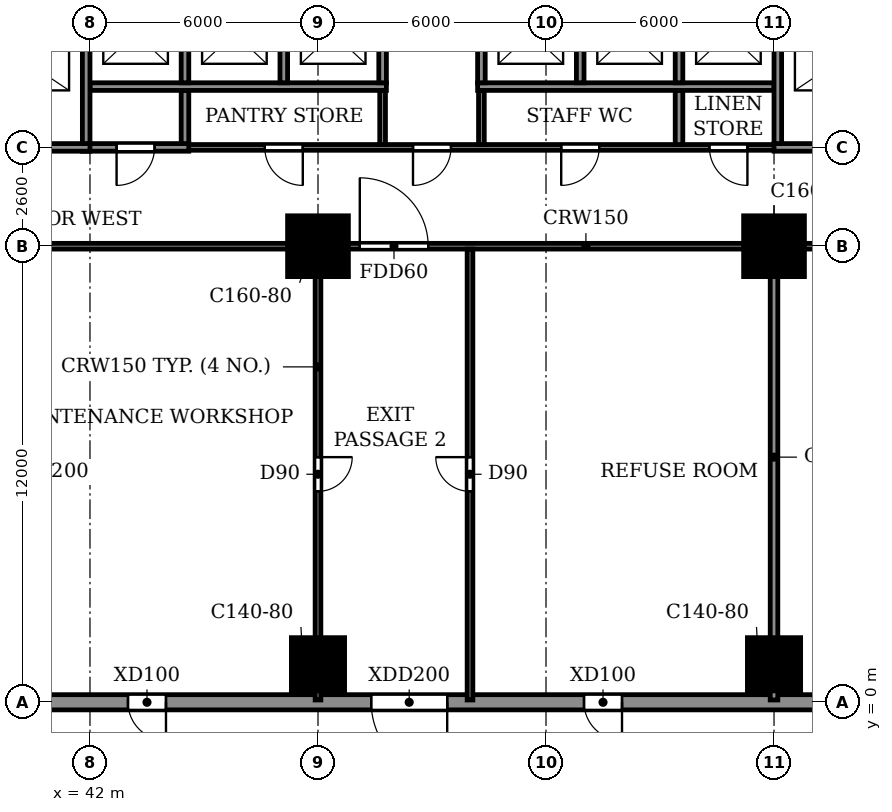
"""IFC4 building model, lengths in metres.
Left out: names, types, materials, properties, quantities, classifications, styles, units other than length and angle.
Written with IfcOpenShell. Run it as: python <this file> out.ifc"""

import sys

from ifc_helpers import new_model, si_unit, direction, frame, frame_2d, origin, origin_2d, place, context, subcontext, project, spatial, rectangle, extrude, source, transform, mapped, element, fill, save


model = new_model("IFC4")
c1 = context("Model", 3, precision=1e-05, world=origin(), true_north=direction((0.0, 1.0)))
c2 = subcontext(c1, "Body", "Model", "MODEL_VIEW")
j1 = project(units=[si_unit("LENGTHUNIT", "METRE"), si_unit("PLANEANGLEUNIT", "RADIAN")], contexts=[c1])
p1 = place(None, origin())
s1 = spatial("IfcSite", under=j1, at=p1, CompositionType="ELEMENT")
p2 = place(p1, origin())
s2 = spatial("IfcBuilding", under=s1, at=p2, CompositionType="ELEMENT")
p3 = place(p2, origin())
s3 = spatial("IfcBuildingStorey", under=s2, at=p3, CompositionType="ELEMENT", Elevation=0.0)
m1 = source(origin(), c2, "Body", "SweptSolid", [
    extrude(rectangle(XDim=1.4, YDim=1.4, at=origin_2d()), origin(), (0.0, 0.0, 1.0), 4.5),
])
p4 = place(p3, frame((48.0, 1.0, -0.3), z_axis=(0.0, 0.0, 1.0), x_axis=(1.0, 0.0, 0.0)))
e1 = element("IfcColumn", 1, at=p4, inside=s3, PredefinedType="COLUMN", context=c2, shape_type="MappedRepresentation", body=[
    mapped(m1, transform((0.0, 0.0, 0.0))),
])
m2 = source(origin(), c2, "Body", "SweptSolid", [
    extrude(rectangle(XDim=1.6, YDim=1.6, at=origin_2d()), origin(), (0.0, 0.0, 1.0), 4.5),
])
p5 = place(p3, frame((48.0, 12.0, -0.3), z_axis=(0.0, 0.0, 1.0), x_axis=(1.0, 0.0, 0.0)))
e2 = element("IfcColumn", 2, at=p5, inside=s3, PredefinedType="COLUMN", context=c2, shape_type="MappedRepresentation", body=[
    mapped(m2, transform((0.0, 0.0, 0.0))),
])
p6 = place(p3, frame((60.0, 1.0, -0.3), z_axis=(0.0, 0.0, 1.0), x_axis=(1.0, 0.0, 0.0)))
e3 = element("IfcColumn", 3, at=p6, inside=s3, PredefinedType="COLUMN", context=c2, shape_type="MappedRepresentation", body=[
    mapped(m1, transform((0.0, 0.0, 0.0))),
])
p7 = place(p3, frame((60.0, 12.0, -0.3), z_axis=(0.0, 0.0, 1.0), x_axis=(1.0, 0.0, 0.0)))
e4 = element("IfcColumn", 4, at=p7, inside=s3, PredefinedType="COLUMN", context=c2, shape_type="MappedRepresentation", body=[
    mapped(m2, transform((0.0, 0.0, 0.0))),
])
p8 = place(p3, frame((-0.2, 0.0, 0.0), z_axis=(0.0, 0.0, 1.0), x_axis=(1.0, 0.0, 0.0)))
e5 = element("IfcWall", 5, at=p8, inside=s3, PredefinedType="STANDARD", context=c2, shape_type="SweptSolid", body=[
    extrude(rectangle(XDim=102.4, YDim=0.4, at=frame_2d((51.2, 0.0))), origin(), (0.0, 0.0, 1.0), 4.2),
])
p9 = place(p8, frame((13.6, 0.0, 0.0)))
e6 = element("IfcOpeningElement", 6, at=p9, cuts=e5, PredefinedType="OPENING", context=c2, shape_type="SweptSolid", body=[
    extrude(rectangle(XDim=2.0, YDim=2.4, at=frame_2d((1.0, 1.2))), frame((0.0, 0.21, 0.0), z_axis=(0.0, -1.0, 0.0), x_axis=(1.0, 0.0, 0.0)), (0.0, 0.0, 1.0), 0.42),
])
p10 = place(p8, frame((43.2, 0.0, 0.0)))
e7 = element("IfcOpeningElement", 7, at=p10, cuts=e5, PredefinedType="OPENING", context=c2, shape_type="SweptSolid", body=[
    extrude(rectangle(XDim=1.0, YDim=2.1, at=frame_2d((0.5, 1.05))), frame((0.0, 0.21, 0.0), z_axis=(0.0, -1.0, 0.0), x_axis=(1.0, 0.0, 0.0)), (0.0, 0.0, 1.0), 0.42),
])
p11 = place(p8, frame((49.6, 0.0, 0.0)))
e8 = element("IfcOpeningElement", 8, at=p11, cuts=e5, PredefinedType="OPENING", context=c2, shape_type="SweptSolid", body=[
    extrude(rectangle(XDim=2.0, YDim=2.4, at=frame_2d((1.0, 1.2))), frame((0.0, 0.21, 0.0), z_axis=(0.0, -1.0, 0.0), x_axis=(1.0, 0.0, 0.0)), (0.0, 0.0, 1.0), 0.42),
])
p12 = place(p8, frame((55.2, 0.0, 0.0)))
e9 = element("IfcOpeningElement", 9, at=p12, cuts=e5, PredefinedType="OPENING", context=c2, shape_type="SweptSolid", body=[
    extrude(rectangle(XDim=1.0, YDim=2.1, at=frame_2d((0.5, 1.05))), frame((0.0, 0.21, 0.0), z_axis=(0.0, -1.0, 0.0), x_axis=(1.0, 0.0, 0.0)), (0.0, 0.0, 1.0), 0.42),
])
p13 = place(p8, frame((65.2, 0.0, 0.0)))
e10 = element("IfcOpeningElement", 10, at=p13, cuts=e5, PredefinedType="OPENING", context=c2, shape_type="SweptSolid", body=[
    extrude(rectangle(XDim=2.0, YDim=2.4, at=frame_2d((1.0, 1.2))), frame((0.0, 0.21, 0.0), z_axis=(0.0, -1.0, 0.0), x_axis=(1.0, 0.0, 0.0)), (0.0, 0.0, 1.0), 0.42),
])
p14 = place(p8, frame((77.2, 0.0, 0.0)))
e11 = element("IfcOpeningElement", 11, at=p14, cuts=e5, PredefinedType="OPENING", context=c2, shape_type="SweptSolid", body=[
    extrude(rectangle(XDim=2.0, YDim=2.4, at=frame_2d((1.0, 1.2))), frame((0.0, 0.21, 0.0), z_axis=(0.0, -1.0, 0.0), x_axis=(1.0, 0.0, 0.0)), (0.0, 0.0, 1.0), 0.42),
])
p15 = place(p8, frame((86.2, 0.0, 0.0)))
e12 = element("IfcOpeningElement", 12, at=p15, cuts=e5, PredefinedType="OPENING", context=c2, shape_type="SweptSolid", body=[
    extrude(rectangle(XDim=2.0, YDim=2.4, at=frame_2d((1.0, 1.2))), frame((0.0, 0.21, 0.0), z_axis=(0.0, -1.0, 0.0), x_axis=(1.0, 0.0, 0.0)), (0.0, 0.0, 1.0), 0.42),
])
p16 = place(p8, frame((90.7, 0.0, 0.0)))
e13 = element("IfcOpeningElement", 13, at=p16, cuts=e5, PredefinedType="OPENING", context=c2, shape_type="SweptSolid", body=[
    extrude(rectangle(XDim=2.0, YDim=2.4, at=frame_2d((1.0, 1.2))), frame((0.0, 0.21, 0.0), z_axis=(0.0, -1.0, 0.0), x_axis=(1.0, 0.0, 0.0)), (0.0, 0.0, 1.0), 0.42),
])
p17 = place(p8, frame((98.2, 0.0, 0.0)))
e14 = element("IfcOpeningElement", 14, at=p17, cuts=e5, PredefinedType="OPENING", context=c2, shape_type="SweptSolid", body=[
    extrude(rectangle(XDim=2.0, YDim=2.4, at=frame_2d((1.0, 1.2))), frame((0.0, 0.21, 0.0), z_axis=(0.0, -1.0, 0.0), x_axis=(1.0, 0.0, 0.0)), (0.0, 0.0, 1.0), 0.42),
])
p18 = place(p3, frame((38.9, 12.0, 0.0), z_axis=(0.0, 0.0, 1.0), x_axis=(1.0, 0.0, 0.0)))
e15 = element("IfcWall", 15, at=p18, inside=s3, PredefinedType="PARTITIONING", context=c2, shape_type="SweptSolid", body=[
    extrude(rectangle(XDim=63.1, YDim=0.15, at=frame_2d((31.55, 0.0))), origin(), (0.0, 0.0, 1.0), 4.2),
])
p19 = place(p18, frame((10.2, 0.0, 0.0)))
e16 = element("IfcOpeningElement", 16, at=p19, cuts=e15, PredefinedType="OPENING", context=c2, shape_type="SweptSolid", body=[
    extrude(rectangle(XDim=1.8, YDim=2.1, at=frame_2d((0.9, 1.05))), frame((0.0, 0.085, 0.0), z_axis=(0.0, -1.0, 0.0), x_axis=(1.0, 0.0, 0.0)), (0.0, 0.0, 1.0), 0.17),
])
p20 = place(p18, frame((23.65, 0.0, 0.0)))
e17 = element("IfcOpeningElement", 17, at=p20, cuts=e15, PredefinedType="OPENING", context=c2, shape_type="SweptSolid", body=[
    extrude(rectangle(XDim=0.9, YDim=2.1, at=frame_2d((0.45, 1.05))), frame((0.0, 0.085, 0.0), z_axis=(0.0, -1.0, 0.0), x_axis=(1.0, 0.0, 0.0)), (0.0, 0.0, 1.0), 0.17),
])
p21 = place(p18, frame((38.65, 0.0, 0.0)))
e18 = element("IfcOpeningElement", 18, at=p21, cuts=e15, PredefinedType="OPENING", context=c2, shape_type="SweptSolid", body=[
    extrude(rectangle(XDim=0.9, YDim=2.1, at=frame_2d((0.45, 1.05))), frame((0.0, 0.085, 0.0), z_axis=(0.0, -1.0, 0.0), x_axis=(1.0, 0.0, 0.0)), (0.0, 0.0, 1.0), 0.17),
])
p22 = place(p18, frame((51.7, 0.0, 0.0)))
e19 = element("IfcOpeningElement", 19, at=p22, cuts=e15, PredefinedType="OPENING", context=c2, shape_type="SweptSolid", body=[
    extrude(rectangle(XDim=1.8, YDim=2.1, at=frame_2d((0.9, 1.05))), frame((0.0, 0.085, 0.0), z_axis=(0.0, -1.0, 0.0), x_axis=(1.0, 0.0, 0.0)), (0.0, 0.0, 1.0), 0.17),
])
p23 = place(p3, frame((44.4, 14.6, 0.0), z_axis=(0.0, 0.0, 1.0), x_axis=(1.0, 0.0, 0.0)))
e20 = element("IfcWall", 20, at=p23, inside=s3, PredefinedType="PARTITIONING", context=c2, shape_type="SweptSolid", body=[
    extrude(rectangle(XDim=15.8, YDim=0.15, at=frame_2d((7.9, 0.0))), origin(), (0.0, 0.0, 1.0), 4.2),
])
p24 = place(p23, frame((2.2, 0.0, 0.0)))
e21 = element("IfcOpeningElement", 21, at=p24, cuts=e20, PredefinedType="OPENING", context=c2, shape_type="SweptSolid", body=[
    extrude(rectangle(XDim=1.0, YDim=2.1, at=frame_2d((0.5, 1.05))), frame((0.0, 0.085, 0.0), z_axis=(0.0, -1.0, 0.0), x_axis=(1.0, 0.0, 0.0)), (0.0, 0.0, 1.0), 0.17),
])
p25 = place(p23, frame((6.1, 0.0, 0.0)))
e22 = element("IfcOpeningElement", 22, at=p25, cuts=e20, PredefinedType="OPENING", context=c2, shape_type="SweptSolid", body=[
    extrude(rectangle(XDim=1.0, YDim=2.1, at=frame_2d((0.5, 1.05))), frame((0.0, 0.085, 0.0), z_axis=(0.0, -1.0, 0.0), x_axis=(1.0, 0.0, 0.0)), (0.0, 0.0, 1.0), 0.17),
])
p26 = place(p23, frame((10.0, 0.0, 0.0)))
e23 = element("IfcOpeningElement", 23, at=p26, cuts=e20, PredefinedType="OPENING", context=c2, shape_type="SweptSolid", body=[
    extrude(rectangle(XDim=1.0, YDim=2.1, at=frame_2d((0.5, 1.05))), frame((0.0, 0.085, 0.0), z_axis=(0.0, -1.0, 0.0), x_axis=(1.0, 0.0, 0.0)), (0.0, 0.0, 1.0), 0.17),
])
p27 = place(p23, frame((13.9, 0.0, 0.0)))
e24 = element("IfcOpeningElement", 24, at=p27, cuts=e20, PredefinedType="OPENING", context=c2, shape_type="SweptSolid", body=[
    extrude(rectangle(XDim=1.0, YDim=2.1, at=frame_2d((0.5, 1.05))), frame((0.0, 0.085, 0.0), z_axis=(0.0, -1.0, 0.0), x_axis=(1.0, 0.0, 0.0)), (0.0, 0.0, 1.0), 0.17),
])
p28 = place(p3, frame((48.0, 0.06, 0.0), z_axis=(0.0, 0.0, 1.0), x_axis=(0.0, 1.0, 0.0)))
e25 = element("IfcWall", 25, at=p28, inside=s3, PredefinedType="PARTITIONING", context=c2, shape_type="SweptSolid", body=[
    extrude(rectangle(XDim=11.865, YDim=0.15, at=frame_2d((5.933, 0.0))), origin(), (0.0, 0.0, 1.0), 4.2),
])
p29 = place(p28, frame((5.49, 0.0, 0.0)))
e26 = element("IfcOpeningElement", 26, at=p29, cuts=e25, PredefinedType="OPENING", context=c2, shape_type="SweptSolid", body=[
    extrude(rectangle(XDim=0.9, YDim=2.1, at=frame_2d((0.45, 1.05))), frame((0.0, 0.085, 0.0), z_axis=(0.0, -1.0, 0.0), x_axis=(1.0, 0.0, 0.0)), (0.0, 0.0, 1.0), 0.17),
])
p30 = place(p3, frame((49.7, 14.675, 0.0), z_axis=(0.0, 0.0, 1.0), x_axis=(0.0, 1.0, 0.0)))
e27 = element("IfcWall", 27, at=p30, inside=s3, PredefinedType="PARTITIONING", context=c2, shape_type="SweptSolid", body=[
    extrude(rectangle(XDim=1.425, YDim=0.15, at=frame_2d((0.712, 0.0))), origin(), (0.0, 0.0, 1.0), 4.2),
])
p31 = place(p3, frame((52.0, 0.06, 0.0), z_axis=(0.0, 0.0, 1.0), x_axis=(0.0, 1.0, 0.0)))
e28 = element("IfcWall", 28, at=p31, inside=s3, PredefinedType="PARTITIONING", context=c2, shape_type="SweptSolid", body=[
    extrude(rectangle(XDim=11.865, YDim=0.15, at=frame_2d((5.933, 0.0))), origin(), (0.0, 0.0, 1.0), 4.2),
])
p32 = place(p31, frame((5.49, 0.0, 0.0)))
e29 = element("IfcOpeningElement", 29, at=p32, cuts=e28, PredefinedType="OPENING", context=c2, shape_type="SweptSolid", body=[
    extrude(rectangle(XDim=0.9, YDim=2.1, at=frame_2d((0.45, 1.05))), frame((0.0, 0.085, 0.0), z_axis=(0.0, -1.0, 0.0), x_axis=(1.0, 0.0, 0.0)), (0.0, 0.0, 1.0), 0.17),
])
p33 = place(p3, frame((52.3, 14.675, 0.0), z_axis=(0.0, 0.0, 1.0), x_axis=(0.0, 1.0, 0.0)))
e30 = element("IfcWall", 30, at=p33, inside=s3, PredefinedType="PARTITIONING", context=c2, shape_type="SweptSolid", body=[
    extrude(rectangle(XDim=1.425, YDim=0.15, at=frame_2d((0.712, 0.0))), origin(), (0.0, 0.0, 1.0), 4.2),
])
p34 = place(p3, frame((41.8, 14.6, 0.0), z_axis=(0.0, 0.0, 1.0), x_axis=(1.0, 0.0, 0.0)))
e31 = element("IfcWall", 31, at=p34, inside=s3, PredefinedType="PARTITIONING", context=c2, shape_type="SweptSolid", body=[
    extrude(rectangle(XDim=2.8, YDim=0.2, at=frame_2d((1.4, 0.0))), origin(), (0.0, 0.0, 1.0), 4.2),
])
p35 = place(p34, frame((0.9, 0.0, 0.0)))
e32 = element("IfcOpeningElement", 32, at=p35, cuts=e31, PredefinedType="OPENING", context=c2, shape_type="SweptSolid", body=[
    extrude(rectangle(XDim=1.0, YDim=2.1, at=frame_2d((0.5, 1.05))), frame((0.0, 0.11, 0.0), z_axis=(0.0, -1.0, 0.0), x_axis=(1.0, 0.0, 0.0)), (0.0, 0.0, 1.0), 0.22),
])
p36 = place(p3, frame((44.5, 14.7, 0.0), z_axis=(0.0, 0.0, 1.0), x_axis=(0.0, 1.0, 0.0)))
e33 = element("IfcWall", 33, at=p36, inside=s3, PredefinedType="PARTITIONING", context=c2, shape_type="SweptSolid", body=[
    extrude(rectangle(XDim=1.4, YDim=0.2, at=frame_2d((0.7, 0.0))), origin(), (0.0, 0.0, 1.0), 4.2),
])
p37 = place(p3, frame((57.5, 14.675, 0.0), z_axis=(0.0, 0.0, 1.0), x_axis=(0.0, 1.0, 0.0)))
e34 = element("IfcWall", 34, at=p37, inside=s3, PredefinedType="PARTITIONING", context=c2, shape_type="SweptSolid", body=[
    extrude(rectangle(XDim=1.425, YDim=0.2, at=frame_2d((0.712, 0.0))), origin(), (0.0, 0.0, 1.0), 4.2),
])
p38 = place(p3, frame((60.0, 0.06, 0.0), z_axis=(0.0, 0.0, 1.0), x_axis=(0.0, 1.0, 0.0)))
e35 = element("IfcWall", 35, at=p38, inside=s3, PredefinedType="PARTITIONING", context=c2, shape_type="SweptSolid", body=[
    extrude(rectangle(XDim=11.865, YDim=0.2, at=frame_2d((5.933, 0.0))), origin(), (0.0, 0.0, 1.0), 4.2),
])
for number, where, z_axis, x_axis in (
    (36, (33.935, 14.6, 0.0), (0.0, 0.0, 1.0), (1.0, 0.0, 0.0)),
    (37, (60.0, 14.6, 0.0), (0.0, 0.0, 1.0), (1.0, 0.0, 0.0)),
):
    element("IfcWall", number, at=place(p3, frame(where, z_axis=z_axis, x_axis=x_axis)), inside=s3, PredefinedType="PARTITIONING", context=c2, shape_type="SweptSolid", body=[
        extrude(rectangle(XDim=8.065, YDim=0.2, at=frame_2d((4.032, 0.0))), origin(), (0.0, 0.0, 1.0), 4.2),
    ])
for number, where, z_axis, x_axis in (
    (38, (42.0, 16.2, 0.0), (0.0, 0.0, 1.0), (1.0, 0.0, 0.0)),
    (39, (52.2, 16.2, 0.0), (0.0, 0.0, 1.0), (1.0, 0.0, 0.0)),
):
    element("IfcWall", number, at=place(p3, frame(where, z_axis=z_axis, x_axis=x_axis)), inside=s3, PredefinedType="PARTITIONING", context=c2, shape_type="SweptSolid", body=[
        extrude(rectangle(XDim=7.8, YDim=0.2, at=frame_2d((3.9, 0.0))), origin(), (0.0, 0.0, 1.0), 4.2),
    ])
p39 = place(p3, frame((41.9, 14.7, 0.0), z_axis=(0.0, 0.0, 1.0), x_axis=(0.0, 1.0, 0.0)))
e40 = element("IfcWall", 40, at=p39, inside=s3, PredefinedType="PARTITIONING", context=c2, shape_type="SweptSolid", body=[
    extrude(rectangle(XDim=4.065, YDim=0.2, at=frame_2d((2.032, 0.0))), origin(), (0.0, 0.0, 1.0), 4.2),
])
for number, where, z_axis, x_axis in (
    (41, (44.5, 16.3, 0.0), (0.0, 0.0, 1.0), (0.0, 1.0, 0.0)),
    (42, (47.1, 16.3, 0.0), (0.0, 0.0, 1.0), (0.0, 1.0, 0.0)),
    (43, (49.7, 16.3, 0.0), (0.0, 0.0, 1.0), (0.0, 1.0, 0.0)),
    (44, (52.3, 16.3, 0.0), (0.0, 0.0, 1.0), (0.0, 1.0, 0.0)),
    (45, (54.9, 16.3, 0.0), (0.0, 0.0, 1.0), (0.0, 1.0, 0.0)),
    (46, (57.5, 16.3, 0.0), (0.0, 0.0, 1.0), (0.0, 1.0, 0.0)),
):
    element("IfcWall", number, at=place(p3, frame(where, z_axis=z_axis, x_axis=x_axis)), inside=s3, PredefinedType="PARTITIONING", context=c2, shape_type="SweptSolid", body=[
        extrude(rectangle(XDim=2.465, YDim=0.2, at=frame_2d((1.232, 0.0))), origin(), (0.0, 0.0, 1.0), 4.2),
    ])
p40 = place(p3, frame((60.1, 14.7, 0.0), z_axis=(0.0, 0.0, 1.0), x_axis=(0.0, 1.0, 0.0)))
e47 = element("IfcWall", 47, at=p40, inside=s3, PredefinedType="PARTITIONING", context=c2, shape_type="SweptSolid", body=[
    extrude(rectangle(XDim=4.065, YDim=0.2, at=frame_2d((2.032, 0.0))), origin(), (0.0, 0.0, 1.0), 4.2),
])
p41 = place(p10, frame((1.0, 0.0, 0.0), z_axis=(0.0, 0.0, 1.0), x_axis=(-1.0, 0.0, 0.0)))
e48 = element("IfcDoor", 48, at=p41, inside=s3, OperationType="SINGLE_SWING_LEFT", PredefinedType="DOOR", context=c2, shape_type="SweptSolid", body=[
    extrude(rectangle(XDim=1.0, YDim=2.1, at=frame_2d((0.5, 1.05))), frame((0.0, 0.025, 0.0), z_axis=(0.0, -1.0, 0.0), x_axis=(1.0, 0.0, 0.0)), (0.0, 0.0, 1.0), 0.05),
])
fill(e7, e48)
p42 = place(p29, frame((0.9, 0.0, 0.0), z_axis=(0.0, 0.0, 1.0), x_axis=(-1.0, 0.0, 0.0)))
e49 = element("IfcDoor", 49, at=p42, inside=s3, OperationType="SINGLE_SWING_LEFT", PredefinedType="DOOR", context=c2, shape_type="SweptSolid", body=[
    extrude(rectangle(XDim=0.9, YDim=2.1, at=frame_2d((0.45, 1.05))), frame((0.0, 0.025, 0.0), z_axis=(0.0, -1.0, 0.0), x_axis=(1.0, 0.0, 0.0)), (0.0, 0.0, 1.0), 0.05),
])
fill(e26, e49)
p43 = place(p11, frame((2.0, 0.0, 0.0), z_axis=(0.0, 0.0, 1.0), x_axis=(-1.0, 0.0, 0.0)))
e50 = element("IfcDoor", 50, at=p43, inside=s3, OperationType="DOUBLE_DOOR_SINGLE_SWING", PredefinedType="DOOR", context=c2, shape_type="SweptSolid", body=[
    extrude(rectangle(XDim=2.0, YDim=2.4, at=frame_2d((1.0, 1.2))), frame((0.0, 0.025, 0.0), z_axis=(0.0, -1.0, 0.0), x_axis=(1.0, 0.0, 0.0)), (0.0, 0.0, 1.0), 0.05),
])
fill(e8, e50)
p44 = place(p32, origin())
e51 = element("IfcDoor", 51, at=p44, inside=s3, OperationType="SINGLE_SWING_RIGHT", PredefinedType="DOOR", context=c2, shape_type="SweptSolid", body=[
    extrude(rectangle(XDim=0.9, YDim=2.1, at=frame_2d((0.45, 1.05))), frame((0.0, 0.025, 0.0), z_axis=(0.0, -1.0, 0.0), x_axis=(1.0, 0.0, 0.0)), (0.0, 0.0, 1.0), 0.05),
])
fill(e29, e51)
p45 = place(p12, frame((1.0, 0.0, 0.0), z_axis=(0.0, 0.0, 1.0), x_axis=(-1.0, 0.0, 0.0)))
e52 = element("IfcDoor", 52, at=p45, inside=s3, OperationType="SINGLE_SWING_LEFT", PredefinedType="DOOR", context=c2, shape_type="SweptSolid", body=[
    extrude(rectangle(XDim=1.0, YDim=2.1, at=frame_2d((0.5, 1.05))), frame((0.0, 0.025, 0.0), z_axis=(0.0, -1.0, 0.0), x_axis=(1.0, 0.0, 0.0)), (0.0, 0.0, 1.0), 0.05),
])
fill(e9, e52)
p46 = place(p35, frame((1.0, 0.0, 0.0), z_axis=(0.0, 0.0, 1.0), x_axis=(-1.0, 0.0, 0.0)))
e53 = element("IfcDoor", 53, at=p46, inside=s3, OperationType="SINGLE_SWING_RIGHT", PredefinedType="DOOR", context=c2, shape_type="SweptSolid", body=[
    extrude(rectangle(XDim=1.0, YDim=2.1, at=frame_2d((0.5, 1.05))), frame((0.0, 0.025, 0.0), z_axis=(0.0, -1.0, 0.0), x_axis=(1.0, 0.0, 0.0)), (0.0, 0.0, 1.0), 0.05),
])
fill(e32, e53)
p47 = place(p24, frame((1.0, 0.0, 0.0), z_axis=(0.0, 0.0, 1.0), x_axis=(-1.0, 0.0, 0.0)))
e54 = element("IfcDoor", 54, at=p47, inside=s3, OperationType="SINGLE_SWING_LEFT", PredefinedType="DOOR", context=c2, shape_type="SweptSolid", body=[
    extrude(rectangle(XDim=1.0, YDim=2.1, at=frame_2d((0.5, 1.05))), frame((0.0, 0.025, 0.0), z_axis=(0.0, -1.0, 0.0), x_axis=(1.0, 0.0, 0.0)), (0.0, 0.0, 1.0), 0.05),
])
fill(e21, e54)
p48 = place(p19, origin())
e55 = element("IfcDoor", 55, at=p48, inside=s3, OperationType="DOUBLE_DOOR_SINGLE_SWING", PredefinedType="DOOR", context=c2, shape_type="SweptSolid", body=[
    extrude(rectangle(XDim=1.8, YDim=2.1, at=frame_2d((0.9, 1.05))), frame((0.0, 0.025, 0.0), z_axis=(0.0, -1.0, 0.0), x_axis=(1.0, 0.0, 0.0)), (0.0, 0.0, 1.0), 0.05),
])
fill(e16, e55)
p49 = place(p25, frame((1.0, 0.0, 0.0), z_axis=(0.0, 0.0, 1.0), x_axis=(-1.0, 0.0, 0.0)))
e56 = element("IfcDoor", 56, at=p49, inside=s3, OperationType="SINGLE_SWING_RIGHT", PredefinedType="DOOR", context=c2, shape_type="SweptSolid", body=[
    extrude(rectangle(XDim=1.0, YDim=2.1, at=frame_2d((0.5, 1.05))), frame((0.0, 0.025, 0.0), z_axis=(0.0, -1.0, 0.0), x_axis=(1.0, 0.0, 0.0)), (0.0, 0.0, 1.0), 0.05),
])
fill(e22, e56)
p50 = place(p26, frame((1.0, 0.0, 0.0), z_axis=(0.0, 0.0, 1.0), x_axis=(-1.0, 0.0, 0.0)))
e57 = element("IfcDoor", 57, at=p50, inside=s3, OperationType="SINGLE_SWING_RIGHT", PredefinedType="DOOR", context=c2, shape_type="SweptSolid", body=[
    extrude(rectangle(XDim=1.0, YDim=2.1, at=frame_2d((0.5, 1.05))), frame((0.0, 0.025, 0.0), z_axis=(0.0, -1.0, 0.0), x_axis=(1.0, 0.0, 0.0)), (0.0, 0.0, 1.0), 0.05),
])
fill(e23, e57)
p51 = place(p27, frame((1.0, 0.0, 0.0), z_axis=(0.0, 0.0, 1.0), x_axis=(-1.0, 0.0, 0.0)))
e58 = element("IfcDoor", 58, at=p51, inside=s3, OperationType="SINGLE_SWING_LEFT", PredefinedType="DOOR", context=c2, shape_type="SweptSolid", body=[
    extrude(rectangle(XDim=1.0, YDim=2.1, at=frame_2d((0.5, 1.05))), frame((0.0, 0.025, 0.0), z_axis=(0.0, -1.0, 0.0), x_axis=(1.0, 0.0, 0.0)), (0.0, 0.0, 1.0), 0.05),
])
fill(e24, e58)
save(model, sys.argv[1])
